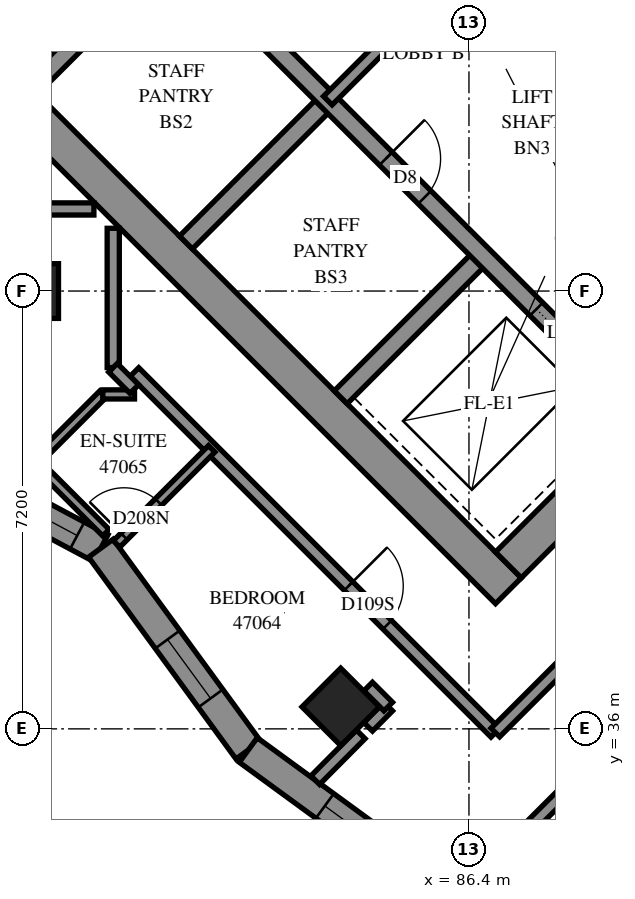
"""IFC4 building model, lengths in metres.
Left out: names, types, materials, properties, quantities, classifications, styles, units other than length and angle.
Written with IfcOpenShell. Run it as: python <this file> out.ifc"""

import sys

from ifc_helpers import new_model, si_unit, direction, frame, frame_2d, origin, origin_2d, place, context, subcontext, project, spatial, polyline, rectangle, outline, extrude, element, fill, save


model = new_model("IFC4")
c1 = context("Model", 3, precision=1e-05, world=origin(), true_north=direction((0.0, 1.0)))
c2 = subcontext(c1, "Body", "Model", "MODEL_VIEW")
j1 = project(units=[si_unit("LENGTHUNIT", "METRE"), si_unit("PLANEANGLEUNIT", "RADIAN")], contexts=[c1])
p1 = place(None, origin())
s1 = spatial("IfcSite", under=j1, at=p1, CompositionType="ELEMENT")
p2 = place(p1, origin())
s2 = spatial("IfcBuilding", under=s1, at=p2, CompositionType="ELEMENT")
p3 = place(p2, frame((0.0, 0.0, 172.8)))
s3 = spatial("IfcBuildingStorey", under=s2, at=p3, CompositionType="ELEMENT", Elevation=172.8)
for number, where, z_axis, x_axis in (
    (1, (79.2, 43.2, 0.0), (0.0, 0.0, 1.0), (1.0, 0.0, 0.0)),
    (2, (84.291, 36.362, 0.0), (0.0, 0.0, 1.0), (0.707, -0.707, 0.0)),
):
    element("IfcColumn", number, at=place(p3, frame(where, z_axis=z_axis, x_axis=x_axis)), inside=s3, PredefinedType="COLUMN", context=c2, shape_type="SweptSolid", body=[
        extrude(rectangle(XDim=0.9, YDim=0.9, at=origin_2d()), origin(), (0.0, 0.0, 1.0), 3.1),
    ])
p4 = place(p3, frame((76.018, 49.302, -0.3), z_axis=(0.0, 0.0, 1.0), x_axis=(0.7071067812, -0.7071067812, 0.0)))
e3 = element("IfcWall", 3, at=p4, inside=s3, PredefinedType="SHEAR", context=c2, shape_type="SweptSolid", body=[
    extrude(rectangle(XDim=15.6, YDim=0.6, at=frame_2d((7.8, 0.0))), origin(), (0.0, 0.0, 1.0), 2.7),
])
p5 = place(p3, frame((87.049, 38.695, -0.3), z_axis=(0.0, 0.0, 1.0), x_axis=(0.7071067812, 0.7071067812, 0.0)))
e4 = element("IfcWall", 4, at=p5, inside=s3, PredefinedType="SHEAR", context=c2, shape_type="SweptSolid", body=[
    extrude(rectangle(XDim=14.4, YDim=0.6, at=frame_2d((7.2, 0.0))), origin(), (0.0, 0.0, 1.0), 2.7),
])
p6 = place(p5, frame((4.55, 0.0, 0.3)))
e5 = element("IfcOpeningElement", 5, at=p6, cuts=e4, PredefinedType="OPENING", context=c2, shape_type="SweptSolid", body=[
    extrude(rectangle(XDim=1.1, YDim=2.1, at=frame_2d((0.55, 1.05))), frame((0.0, 0.31, 0.0), z_axis=(0.0, -1.0, 0.0), x_axis=(1.0, 0.0, 0.0)), (0.0, 0.0, 1.0), 0.62),
])
p7 = place(p5, frame((11.35, 0.0, 0.3)))
e6 = element("IfcOpeningElement", 6, at=p7, cuts=e4, PredefinedType="OPENING", context=c2, shape_type="SweptSolid", body=[
    extrude(rectangle(XDim=1.1, YDim=2.1, at=frame_2d((0.55, 1.05))), frame((0.0, 0.31, 0.0), z_axis=(0.0, -1.0, 0.0), x_axis=(1.0, 0.0, 0.0)), (0.0, 0.0, 1.0), 0.62),
])
p8 = place(p3, frame((79.2, 46.544, 0.0), z_axis=(0.0, 0.0, 1.0), x_axis=(0.7071219326, 0.7070916295, 0.0)))
e7 = element("IfcWall", 7, at=p8, inside=s3, PredefinedType="SOLIDWALL", context=c2, shape_type="SweptSolid", body=[
    extrude(rectangle(XDim=3.3, YDim=0.3, at=frame_2d((1.65, 0.0))), origin(), (0.0, 0.0, 1.0), 3.1),
])
for number, where, z_axis, x_axis in (
    (8, (81.746, 43.999, 0.0), (0.0, 0.0, 1.0), (0.707, 0.707, 0.0)),
    (9, (84.291, 41.453, 0.0), (0.0, 0.0, 1.0), (0.707, 0.707, 0.0)),
):
    element("IfcWall", number, at=place(p3, frame(where, z_axis=z_axis, x_axis=x_axis)), inside=s3, PredefinedType="SOLIDWALL", context=c2, shape_type="SweptSolid", body=[
        extrude(rectangle(XDim=3.3, YDim=0.3, at=frame_2d((1.65, 0.0))), origin(), (0.0, 0.0, 1.0), 3.1),
    ])
p9 = place(p3, frame((78.988, 51.423, 0.0), z_axis=(0.0, 0.0, 1.0), x_axis=(0.7071067812, -0.7071067812, 0.0)))
e10 = element("IfcWall", 10, at=p9, inside=s3, PredefinedType="SOLIDWALL", context=c2, shape_type="SweptSolid", body=[
    extrude(rectangle(XDim=14.4, YDim=0.3, at=frame_2d((7.2, 0.0))), origin(), (0.0, 0.0, 1.0), 3.1),
])
p10 = place(p9, frame((1.35, 0.0, 0.0)))
e11 = element("IfcOpeningElement", 11, at=p10, cuts=e10, PredefinedType="OPENING", context=c2, shape_type="SweptSolid", body=[
    extrude(rectangle(XDim=0.9, YDim=2.1, at=frame_2d((0.45, 1.05))), frame((0.0, 0.16, 0.0), z_axis=(0.0, -1.0, 0.0), x_axis=(1.0, 0.0, 0.0)), (0.0, 0.0, 1.0), 0.32),
])
p11 = place(p9, frame((4.95, 0.0, 0.0)))
e12 = element("IfcOpeningElement", 12, at=p11, cuts=e10, PredefinedType="OPENING", context=c2, shape_type="SweptSolid", body=[
    extrude(rectangle(XDim=0.9, YDim=2.1, at=frame_2d((0.45, 1.05))), frame((0.0, 0.16, 0.0), z_axis=(0.0, -1.0, 0.0), x_axis=(1.0, 0.0, 0.0)), (0.0, 0.0, 1.0), 0.32),
])
p12 = place(p9, frame((8.55, 0.0, 0.0)))
e13 = element("IfcOpeningElement", 13, at=p12, cuts=e10, PredefinedType="OPENING", context=c2, shape_type="SweptSolid", body=[
    extrude(rectangle(XDim=0.9, YDim=2.1, at=frame_2d((0.45, 1.05))), frame((0.0, 0.16, 0.0), z_axis=(0.0, -1.0, 0.0), x_axis=(1.0, 0.0, 0.0)), (0.0, 0.0, 1.0), 0.32),
])
p13 = place(p9, frame((12.05, 0.0, 0.0)))
e14 = element("IfcOpeningElement", 14, at=p13, cuts=e10, PredefinedType="OPENING", context=c2, shape_type="SweptSolid", body=[
    extrude(rectangle(XDim=1.1, YDim=2.1, at=frame_2d((0.55, 1.05))), frame((0.0, 0.16, 0.0), z_axis=(0.0, -1.0, 0.0), x_axis=(1.0, 0.0, 0.0)), (0.0, 0.0, 1.0), 0.32),
])
p14 = place(p3, frame((81.534, 53.969, 0.0), z_axis=(0.0, 0.0, 1.0), x_axis=(0.707103309, -0.7071102534, 0.0)))
e15 = element("IfcWall", 15, at=p14, inside=s3, PredefinedType="SOLIDWALL", context=c2, shape_type="SweptSolid", body=[
    extrude(rectangle(XDim=14.4, YDim=0.3, at=frame_2d((7.2, 0.0))), origin(), (0.0, 0.0, 1.0), 3.1),
])
p15 = place(p14, frame((1.25, 0.0, 0.0)))
e16 = element("IfcOpeningElement", 16, at=p15, cuts=e15, PredefinedType="OPENING", context=c2, shape_type="SweptSolid", body=[
    extrude(rectangle(XDim=1.1, YDim=2.1, at=frame_2d((0.55, 1.05))), frame((0.0, 0.16, 0.0), z_axis=(0.0, -1.0, 0.0), x_axis=(1.0, 0.0, 0.0)), (0.0, 0.0, 1.0), 0.32),
])
p16 = place(p14, frame((4.85, 0.0, 0.0)))
e17 = element("IfcOpeningElement", 17, at=p16, cuts=e15, PredefinedType="OPENING", context=c2, shape_type="SweptSolid", body=[
    extrude(rectangle(XDim=1.1, YDim=2.1, at=frame_2d((0.55, 1.05))), frame((0.0, 0.16, 0.0), z_axis=(0.0, -1.0, 0.0), x_axis=(1.0, 0.0, 0.0)), (0.0, 0.0, 1.0), 0.32),
])
p17 = place(p14, frame((8.45, 0.0, 0.0)))
e18 = element("IfcOpeningElement", 18, at=p17, cuts=e15, PredefinedType="OPENING", context=c2, shape_type="SweptSolid", body=[
    extrude(rectangle(XDim=1.1, YDim=2.1, at=frame_2d((0.55, 1.05))), frame((0.0, 0.16, 0.0), z_axis=(0.0, -1.0, 0.0), x_axis=(1.0, 0.0, 0.0)), (0.0, 0.0, 1.0), 0.32),
])
p18 = place(p14, frame((12.05, 0.0, 0.0)))
e19 = element("IfcOpeningElement", 19, at=p18, cuts=e15, PredefinedType="OPENING", context=c2, shape_type="SweptSolid", body=[
    extrude(rectangle(XDim=1.1, YDim=2.1, at=frame_2d((0.55, 1.05))), frame((0.0, 0.16, 0.0), z_axis=(0.0, -1.0, 0.0), x_axis=(1.0, 0.0, 0.0)), (0.0, 0.0, 1.0), 0.32),
])
p19 = place(p3, frame((76.551, 40.996, 0.0), z_axis=(0.0, 0.0, 1.0), x_axis=(0.8822905093, -0.4707052763, 0.0)))
e20 = element("IfcWall", 20, at=p19, inside=s3, PredefinedType="SOLIDWALL", context=c2, shape_type="SweptSolid", body=[
    extrude(outline(polyline([(0.018, -0.25), (4.244, -0.25), (4.359, 0.25), (-0.018, 0.25), (0.018, -0.25)])), origin(), (0.0, 0.0, 1.0), 3.1),
])
p20 = place(p19, frame((0.31, 0.0, 0.45)))
e21 = element("IfcOpeningElement", 21, at=p20, cuts=e20, PredefinedType="OPENING", context=c2, shape_type="SweptSolid", body=[
    extrude(rectangle(XDim=1.2, YDim=2.5, at=frame_2d((0.6, 1.25))), frame((0.0, 0.26, 0.0), z_axis=(0.0, -1.0, 0.0), x_axis=(1.0, 0.0, 0.0)), (0.0, 0.0, 1.0), 0.52),
])
p21 = place(p19, frame((2.661, 0.0, 0.45)))
e22 = element("IfcOpeningElement", 22, at=p21, cuts=e20, PredefinedType="OPENING", context=c2, shape_type="SweptSolid", body=[
    extrude(rectangle(XDim=1.2, YDim=2.5, at=frame_2d((0.6, 1.25))), frame((0.0, 0.26, 0.0), z_axis=(0.0, -1.0, 0.0), x_axis=(1.0, 0.0, 0.0)), (0.0, 0.0, 1.0), 0.52),
])
p22 = place(p3, frame((80.346, 38.971, 0.0), z_axis=(0.0, 0.0, 1.0), x_axis=(0.5898152736, -0.8075381991, 0.0)))
e23 = element("IfcWall", 23, at=p22, inside=s3, PredefinedType="SOLIDWALL", context=c2, shape_type="SweptSolid", body=[
    extrude(outline(polyline([(0.057, -0.25), (4.149, -0.25), (4.071, 0.25), (-0.057, 0.25), (0.057, -0.25)])), origin(), (0.0, 0.0, 1.0), 3.1),
])
p23 = place(p22, frame((1.859, 0.0, 0.45)))
e24 = element("IfcOpeningElement", 24, at=p23, cuts=e23, PredefinedType="OPENING", context=c2, shape_type="SweptSolid", body=[
    extrude(rectangle(XDim=1.2, YDim=2.5, at=frame_2d((0.6, 1.25))), frame((0.0, 0.26, 0.0), z_axis=(0.0, -1.0, 0.0), x_axis=(1.0, 0.0, 0.0)), (0.0, 0.0, 1.0), 0.52),
])
p24 = place(p3, frame((82.771, 35.652, 0.0), z_axis=(0.0, 0.0, 1.0), x_axis=(0.807533929, -0.58982112, 0.0)))
e25 = element("IfcWall", 25, at=p24, inside=s3, PredefinedType="SOLIDWALL", context=c2, shape_type="SweptSolid", body=[
    extrude(outline(polyline([(-0.039, -0.25), (4.053, -0.25), (4.131, 0.25), (0.039, 0.25), (-0.039, -0.25)])), origin(), (0.0, 0.0, 1.0), 3.1),
])
p25 = place(p24, frame((1.559, 0.0, 0.7)))
e26 = element("IfcOpeningElement", 26, at=p25, cuts=e25, PredefinedType="OPENING", context=c2, shape_type="SweptSolid", body=[
    extrude(rectangle(XDim=1.8, YDim=2.2, at=frame_2d((0.9, 1.1))), frame((0.0, 0.26, 0.0), z_axis=(0.0, -1.0, 0.0), x_axis=(1.0, 0.0, 0.0)), (0.0, 0.0, 1.0), 0.52),
])
p26 = place(p3, frame((84.079, 46.332, 0.0), z_axis=(0.0, 0.0, 1.0), x_axis=(0.7071067812, 0.7071067812, 0.0)))
e27 = element("IfcWall", 27, at=p26, inside=s3, PredefinedType="PARTITIONING", context=c2, shape_type="SweptSolid", body=[
    extrude(rectangle(XDim=3.6, YDim=0.2, at=frame_2d((1.8, 0.0))), origin(), (0.0, 0.0, 1.0), 3.1),
])
p27 = place(p3, frame((80.899, 41.869, 0.0), z_axis=(0.0, 0.0, 1.0), x_axis=(0.7071067812, -0.7071067812, 0.0)))
e28 = element("IfcWall", 28, at=p27, inside=s3, PredefinedType="PARTITIONING", context=c2, shape_type="SweptSolid", body=[
    extrude(rectangle(XDim=8.392, YDim=0.2, at=frame_2d((4.196, 0.0))), origin(), (0.0, 0.0, 1.0), 3.1),
])
p28 = place(p27, frame((4.979, 0.0, 0.0)))
e29 = element("IfcOpeningElement", 29, at=p28, cuts=e28, PredefinedType="OPENING", context=c2, shape_type="SweptSolid", body=[
    extrude(rectangle(XDim=0.9, YDim=2.1, at=frame_2d((0.45, 1.05))), frame((0.0, 0.11, 0.0), z_axis=(0.0, -1.0, 0.0), x_axis=(1.0, 0.0, 0.0)), (0.0, 0.0, 1.0), 0.22),
])
p29 = place(p3, frame((86.834, 35.94, 0.0), z_axis=(0.0, 0.0, 1.0), x_axis=(0.7072486139, 0.7069649201, 0.0)))
e30 = element("IfcWall", 30, at=p29, inside=s3, PredefinedType="PARTITIONING", context=c2, shape_type="SweptSolid", body=[
    extrude(rectangle(XDim=7.05, YDim=0.2, at=frame_2d((3.525, 0.0))), origin(), (0.0, 0.0, 1.0), 3.1),
])
p30 = place(p29, frame((5.848, 0.0, 0.0)))
e31 = element("IfcOpeningElement", 31, at=p30, cuts=e30, PredefinedType="OPENING", context=c2, shape_type="SweptSolid", body=[
    extrude(rectangle(XDim=1.0, YDim=2.1, at=frame_2d((0.5, 1.05))), frame((0.0, 0.11, 0.0), z_axis=(0.0, -1.0, 0.0), x_axis=(1.0, 0.0, 0.0)), (0.0, 0.0, 1.0), 0.22),
])
p31 = place(p3, frame((86.33, 33.314, 0.0), z_axis=(0.0, 0.0, 1.0), x_axis=(0.7072524653, 0.7069610671, 0.0)))
e32 = element("IfcWall", 32, at=p31, inside=s3, PredefinedType="PARTITIONING", context=c2, shape_type="SweptSolid", body=[
    extrude(rectangle(XDim=6.864, YDim=0.2, at=frame_2d((3.432, 0.0))), origin(), (0.0, 0.0, 1.0), 3.1),
])
for number, where, z_axis, x_axis in (
    (33, (77.942, 44.55, 0.0), (0.0, 0.0, 1.0), (1.0, 0.0, 0.0)),
    (34, (80.55, 41.942, 0.0), (0.0, 0.0, 1.0), (0.0, 1.0, 0.0)),
):
    element("IfcWall", number, at=place(p3, frame(where, z_axis=z_axis, x_axis=x_axis)), inside=s3, PredefinedType="PARTITIONING", context=c2, shape_type="SweptSolid", body=[
        extrude(rectangle(XDim=2.29, YDim=0.2, at=frame_2d((1.145, 0.0))), origin(), (0.0, 0.0, 1.0), 3.1),
    ])
p32 = place(p3, frame((80.605, 39.041, 0.0), z_axis=(0.0, 0.0, 1.0), x_axis=(0.7071293873, 0.7070841744, 0.0)))
e35 = element("IfcWall", 35, at=p32, inside=s3, PredefinedType="PARTITIONING", context=c2, shape_type="SweptSolid", body=[
    extrude(rectangle(XDim=2.212, YDim=0.15, at=frame_2d((1.106, 0.0))), origin(), (0.0, 0.0, 1.0), 3.1),
])
p33 = place(p32, frame((0.175, 0.0, 0.0)))
e36 = element("IfcOpeningElement", 36, at=p33, cuts=e35, PredefinedType="OPENING", context=c2, shape_type="SweptSolid", body=[
    extrude(rectangle(XDim=0.8, YDim=2.1, at=frame_2d((0.4, 1.05))), frame((0.0, 0.085, 0.0), z_axis=(0.0, -1.0, 0.0), x_axis=(1.0, 0.0, 0.0)), (0.0, 0.0, 1.0), 0.17),
])
p34 = place(p3, frame((78.902, 40.025, 0.0), z_axis=(0.0, 0.0, 1.0), x_axis=(0.7071307448, 0.7070828167, 0.0)))
e37 = element("IfcWall", 37, at=p34, inside=s3, PredefinedType="PARTITIONING", context=c2, shape_type="SweptSolid", body=[
    extrude(rectangle(XDim=2.087, YDim=0.15, at=frame_2d((1.043, 0.0))), origin(), (0.0, 0.0, 1.0), 3.1),
])
p35 = place(p3, frame((79.267, 40.389, 0.0), z_axis=(0.0, 0.0, 1.0), x_axis=(0.7071067812, -0.7071067812, 0.0)))
e38 = element("IfcWall", 38, at=p35, inside=s3, PredefinedType="PARTITIONING", context=c2, shape_type="SweptSolid", body=[
    extrude(rectangle(XDim=1.644, YDim=0.15, at=frame_2d((0.822, 0.0))), origin(), (0.0, 0.0, 1.0), 3.1),
])
p36 = place(p3, frame((83.872, 35.157, 0.0), z_axis=(0.0, 0.0, 1.0), x_axis=(0.7052194116, 0.7089891265, 0.0)))
e39 = element("IfcWall", 39, at=p36, inside=s3, PredefinedType="PARTITIONING", context=c2, shape_type="SweptSolid", body=[
    extrude(rectangle(XDim=1.061, YDim=0.2, at=frame_2d((0.53, 0.0))), origin(), (0.0, 0.0, 1.0), 3.1),
])
p37 = place(p3, frame((80.378, 41.5, 0.0), z_axis=(0.0, 0.0, 1.0), x_axis=(1.0, 0.0, 0.0)))
e40 = element("IfcWall", 40, at=p37, inside=s3, PredefinedType="PARTITIONING", context=c2, shape_type="SweptSolid", body=[
    extrude(rectangle(XDim=0.522, YDim=0.15, at=frame_2d((0.261, 0.0))), origin(), (0.0, 0.0, 1.0), 3.1),
])
p38 = place(p3, frame((80.546, 41.938, 0.0), z_axis=(0.0, 0.0, 1.0), x_axis=(0.7071067812, -0.7071067812, 0.0)))
e41 = element("IfcWall", 41, at=p38, inside=s3, PredefinedType="PARTITIONING", context=c2, shape_type="SweptSolid", body=[
    extrude(rectangle(XDim=0.495, YDim=0.2, at=frame_2d((0.247, 0.0))), origin(), (0.0, 0.0, 1.0), 3.1),
])
p39 = place(p3, frame((84.742, 36.034, 0.0), z_axis=(0.0, 0.0, 1.0), x_axis=(0.7049672897, 0.7092398187, 0.0)))
e42 = element("IfcWall", 42, at=p39, inside=s3, PredefinedType="PARTITIONING", context=c2, shape_type="SweptSolid", body=[
    extrude(rectangle(XDim=0.468, YDim=0.2, at=frame_2d((0.234, 0.0))), origin(), (0.0, 0.0, 1.0), 3.1),
])
p40 = place(p3, frame((84.742, 36.696, 0.0), z_axis=(0.0, 0.0, 1.0), x_axis=(0.7071067812, -0.7071067812, 0.0)))
e43 = element("IfcWall", 43, at=p40, inside=s3, PredefinedType="PARTITIONING", context=c2, shape_type="SweptSolid", body=[
    extrude(rectangle(XDim=0.467, YDim=0.2, at=frame_2d((0.233, 0.0))), origin(), (0.0, 0.0, 1.0), 3.1),
])
p41 = place(p21, origin())
e44 = element("IfcWindow", 44, at=p41, inside=s3, PartitioningType="SINGLE_PANEL", PredefinedType="WINDOW", context=c2, shape_type="SweptSolid", body=[
    extrude(rectangle(XDim=1.2, YDim=2.5, at=frame_2d((0.6, 1.25))), frame((0.0, 0.18, 0.0), z_axis=(0.0, -1.0, 0.0), x_axis=(1.0, 0.0, 0.0)), (0.0, 0.0, 1.0), 0.06),
])
fill(e22, e44)
p42 = place(p23, origin())
e45 = element("IfcWindow", 45, at=p42, inside=s3, PartitioningType="SINGLE_PANEL", PredefinedType="WINDOW", context=c2, shape_type="SweptSolid", body=[
    extrude(rectangle(XDim=1.2, YDim=2.5, at=frame_2d((0.6, 1.25))), frame((0.0, 0.18, 0.0), z_axis=(0.0, -1.0, 0.0), x_axis=(1.0, 0.0, 0.0)), (0.0, 0.0, 1.0), 0.06),
])
fill(e24, e45)
p43 = place(p12, origin())
e46 = element("IfcDoor", 46, at=p43, inside=s3, OperationType="SINGLE_SWING_LEFT", PredefinedType="DOOR", context=c2, shape_type="SweptSolid", body=[
    extrude(rectangle(XDim=0.9, YDim=2.1, at=frame_2d((0.45, 1.05))), frame((0.0, 0.025, 0.0), z_axis=(0.0, -1.0, 0.0), x_axis=(1.0, 0.0, 0.0)), (0.0, 0.0, 1.0), 0.05),
])
fill(e13, e46)
p44 = place(p13, origin())
e47 = element("IfcDoor", 47, at=p44, inside=s3, OperationType="SLIDING_TO_RIGHT", PredefinedType="DOOR", context=c2, shape_type="SweptSolid", body=[
    extrude(rectangle(XDim=1.1, YDim=2.1, at=frame_2d((0.55, 1.05))), frame((0.0, 0.025, 0.0), z_axis=(0.0, -1.0, 0.0), x_axis=(1.0, 0.0, 0.0)), (0.0, 0.0, 1.0), 0.05),
])
fill(e14, e47)
p45 = place(p28, origin())
e48 = element("IfcDoor", 48, at=p45, inside=s3, OperationType="SINGLE_SWING_RIGHT", PredefinedType="DOOR", context=c2, shape_type="SweptSolid", body=[
    extrude(rectangle(XDim=0.9, YDim=2.1, at=frame_2d((0.45, 1.05))), frame((0.0, 0.025, 0.0), z_axis=(0.0, -1.0, 0.0), x_axis=(1.0, 0.0, 0.0)), (0.0, 0.0, 1.0), 0.05),
])
fill(e29, e48)
p46 = place(p33, origin())
e49 = element("IfcDoor", 49, at=p46, inside=s3, OperationType="SINGLE_SWING_RIGHT", PredefinedType="DOOR", context=c2, shape_type="SweptSolid", body=[
    extrude(rectangle(XDim=0.8, YDim=2.1, at=frame_2d((0.4, 1.05))), frame((0.0, 0.025, 0.0), z_axis=(0.0, -1.0, 0.0), x_axis=(1.0, 0.0, 0.0)), (0.0, 0.0, 1.0), 0.05),
])
fill(e36, e49)
p47 = place(p25, origin())
e50 = element("IfcWindow", 50, at=p47, inside=s3, PartitioningType="SINGLE_PANEL", PredefinedType="WINDOW", context=c2, shape_type="SweptSolid", body=[
    extrude(rectangle(XDim=1.8, YDim=2.2, at=frame_2d((0.9, 1.1))), frame((0.0, 0.18, 0.0), z_axis=(0.0, -1.0, 0.0), x_axis=(1.0, 0.0, 0.0)), (0.0, 0.0, 1.0), 0.06),
])
fill(e26, e50)
save(model, sys.argv[1])
